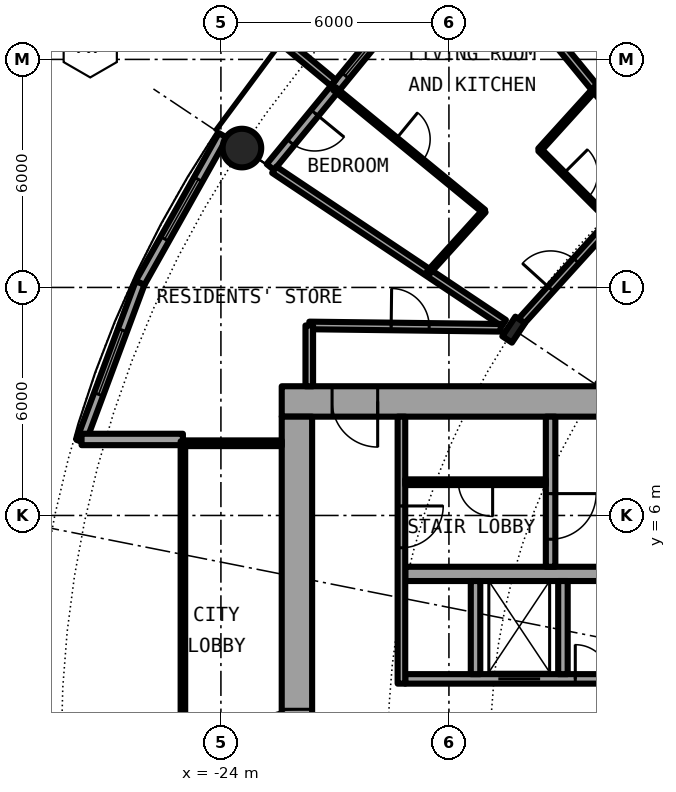
"""IFC4 building model, lengths in metres.
Left out: names, types, materials, properties, quantities, classifications, styles, units other than length and angle.
Written with IfcOpenShell. Run it as: python <this file> out.ifc"""

import sys

from ifc_helpers import new_model, si_unit, direction, frame, frame_2d, origin, origin_2d, place, context, subcontext, project, spatial, rectangle, hollow_circle, i_section, extrude, element, fill, save


model = new_model("IFC4")
c1 = context("Model", 3, precision=1e-05, world=origin(), true_north=direction((0.0, 1.0)))
c2 = subcontext(c1, "Body", "Model", "MODEL_VIEW")
j1 = project(units=[si_unit("LENGTHUNIT", "METRE"), si_unit("PLANEANGLEUNIT", "RADIAN")], contexts=[c1])
p1 = place(None, origin())
s1 = spatial("IfcSite", under=j1, at=p1, CompositionType="ELEMENT")
p2 = place(p1, origin())
s2 = spatial("IfcBuilding", under=s1, at=p2, CompositionType="ELEMENT")
p3 = place(p2, frame((0.0, 0.0, 47.2)))
s3 = spatial("IfcBuildingStorey", under=s2, at=p3, CompositionType="ELEMENT", Elevation=47.2)
p4 = place(p3, frame((-23.448, 15.667, 0.0), z_axis=(0.0, 0.0, 1.0), x_axis=(1.0, 0.0, 0.0)))
e1 = element("IfcColumn", 1, at=p4, inside=s3, PredefinedType="COLUMN", context=c2, shape_type="SweptSolid", body=[
    extrude(hollow_circle(Radius=0.508, WallThickness=0.05, at=origin_2d()), origin(), (0.0, 0.0, 1.0), 3.05),
])
p5 = place(p3, frame((-16.297, 10.889, 0.0), z_axis=(0.0, 0.0, 1.0), x_axis=(-0.831469612303, 0.55557023302, 0.0)))
e2 = element("IfcColumn", 2, at=p5, inside=s3, PredefinedType="COLUMN", context=c2, shape_type="SweptSolid", body=[
    extrude(i_section(OverallWidth=0.305, OverallDepth=0.62, WebThickness=0.021, FlangeThickness=0.04, FilletRadius=0.027, at=origin_2d()), origin(), (0.0, 0.0, 1.0), 3.05),
])
p6 = place(p3, frame((-19.304, 19.304, 0.0), z_axis=(0.0, 0.0, 1.0), x_axis=(-0.634382322723, -0.773019449054, 0.0)))
e3 = element("IfcWall", 3, at=p6, inside=s3, PredefinedType="SOLIDWALL", context=c2, shape_type="SweptSolid", body=[
    extrude(rectangle(XDim=5.352, YDim=0.25, at=frame_2d((2.676, 0.0))), origin(), (0.0, 0.0, 1.0), 2.7),
])
p7 = place(p6, frame((0.441, 0.0, 0.3)))
e4 = element("IfcOpeningElement", 4, at=p7, cuts=e3, PredefinedType="OPENING", context=c2, shape_type="SweptSolid", body=[
    extrude(rectangle(XDim=1.8, YDim=2.1, at=frame_2d((0.9, 1.05))), frame((0.0, 0.135, 0.0), z_axis=(0.0, -1.0, 0.0), x_axis=(1.0, 0.0, 0.0)), (0.0, 0.0, 1.0), 0.27),
])
p8 = place(p6, frame((3.51, 0.0, 0.0)))
e5 = element("IfcOpeningElement", 5, at=p8, cuts=e3, PredefinedType="OPENING", context=c2, shape_type="SweptSolid", body=[
    extrude(rectangle(XDim=1.0, YDim=2.2, at=frame_2d((0.5, 1.1))), frame((0.0, 0.135, 0.0), z_axis=(0.0, -1.0, 0.0), x_axis=(1.0, 0.0, 0.0)), (0.0, 0.0, 1.0), 0.27),
])
p9 = place(p3, frame((-21.041, 17.384, -0.03), z_axis=(0.0, 0.0, 1.0), x_axis=(-0.770784861449, 0.63709551667, 0.0)))
e6 = element("IfcWall", 6, at=p9, inside=s3, PredefinedType="SOLIDWALL", context=c2, shape_type="SweptSolid", body=[
    extrude(rectangle(XDim=3.006, YDim=0.2, at=frame_2d((1.503, 0.0))), origin(), (0.0, 0.0, 1.0), 2.73),
])
p10 = place(p3, frame((-23.946, 16.0, 0.0), z_axis=(0.0, 0.0, 1.0), x_axis=(-0.489696356642, -0.871893042919, 0.0)))
e7 = element("IfcWall", 7, at=p10, inside=s3, PredefinedType="SOLIDWALL", context=c2, shape_type="SweptSolid", body=[
    extrude(rectangle(XDim=4.454, YDim=0.25, at=frame_2d((2.227, 0.0))), origin(), (0.0, 0.0, 1.0), 2.7),
])
p11 = place(p10, frame((1.327, 0.0, 0.3)))
e8 = element("IfcOpeningElement", 8, at=p11, cuts=e7, PredefinedType="OPENING", context=c2, shape_type="SweptSolid", body=[
    extrude(rectangle(XDim=1.8, YDim=2.1, at=frame_2d((0.9, 1.05))), frame((0.0, 0.135, 0.0), z_axis=(0.0, -1.0, 0.0), x_axis=(1.0, 0.0, 0.0)), (0.0, 0.0, 1.0), 0.27),
])
p12 = place(p3, frame((-26.127, 12.117, 0.0), z_axis=(0.0, 0.0, 1.0), x_axis=(-0.349247811493, -0.937030397675, 0.0)))
e9 = element("IfcWall", 9, at=p12, inside=s3, PredefinedType="SOLIDWALL", context=c2, shape_type="SweptSolid", body=[
    extrude(rectangle(XDim=4.452, YDim=0.25, at=frame_2d((2.226, 0.0))), origin(), (0.0, 0.0, 1.0), 2.7),
])
p13 = place(p12, frame((1.327, 0.0, 0.3)))
e10 = element("IfcOpeningElement", 10, at=p13, cuts=e9, PredefinedType="OPENING", context=c2, shape_type="SweptSolid", body=[
    extrude(rectangle(XDim=1.8, YDim=2.1, at=frame_2d((0.9, 1.05))), frame((0.0, 0.135, 0.0), z_axis=(0.0, -1.0, 0.0), x_axis=(1.0, 0.0, 0.0)), (0.0, 0.0, 1.0), 0.27),
])
p14 = place(p3, frame((-25.0, 8.0, 0.0), z_axis=(0.0, 0.0, 1.0), x_axis=(-1.0, 0.0, 0.0)))
e11 = element("IfcWall", 11, at=p14, inside=s3, PredefinedType="SOLIDWALL", context=c2, shape_type="SweptSolid", body=[
    extrude(rectangle(XDim=2.667, YDim=0.3, at=frame_2d((1.333, 0.0))), origin(), (0.0, 0.0, 1.0), 2.7),
])
p15 = place(p3, frame((-8.2, 9.0, 0.0), z_axis=(0.0, 0.0, 1.0), x_axis=(-1.0, 0.0, 0.0)))
e12 = element("IfcWall", 12, at=p15, inside=s3, PredefinedType="SHEAR", context=c2, shape_type="SweptSolid", body=[
    extrude(rectangle(XDim=14.2, YDim=0.8, at=frame_2d((7.1, 0.0))), origin(), (0.0, 0.0, 1.0), 3.05),
])
p16 = place(p15, frame((11.675, 0.0, 0.0)))
e13 = element("IfcOpeningElement", 13, at=p16, cuts=e12, PredefinedType="OPENING", context=c2, shape_type="SweptSolid", body=[
    extrude(rectangle(XDim=1.2, YDim=2.3, at=frame_2d((0.6, 1.15))), frame((0.0, 0.41, 0.0), z_axis=(0.0, -1.0, 0.0), x_axis=(1.0, 0.0, 0.0)), (0.0, 0.0, 1.0), 0.82),
])
p17 = place(p3, frame((-22.0, -8.6, 0.0), z_axis=(0.0, 0.0, 1.0), x_axis=(0.0, 1.0, 0.0)))
e14 = element("IfcWall", 14, at=p17, inside=s3, PredefinedType="SHEAR", context=c2, shape_type="SweptSolid", body=[
    extrude(rectangle(XDim=17.2, YDim=0.8, at=frame_2d((8.6, 0.0))), origin(), (0.0, 0.0, 1.0), 3.05),
])
p18 = place(p17, frame((7.7, 0.0, 0.0)))
e15 = element("IfcOpeningElement", 15, at=p18, cuts=e14, PredefinedType="OPENING", context=c2, shape_type="SweptSolid", body=[
    extrude(rectangle(XDim=1.8, YDim=2.3, at=frame_2d((0.9, 1.15))), frame((0.0, 0.41, 0.0), z_axis=(0.0, -1.0, 0.0), x_axis=(1.0, 0.0, 0.0)), (0.0, 0.0, 1.0), 0.82),
])
p19 = place(p3, frame((-19.15, 1.7, 0.0), z_axis=(0.0, 0.0, 1.0), x_axis=(1.0, 0.0, 0.0)))
e16 = element("IfcWall", 16, at=p19, inside=s3, PredefinedType="SHEAR", context=c2, shape_type="SweptSolid", body=[
    extrude(rectangle(XDim=10.15, YDim=0.25, at=frame_2d((5.075, 0.0))), origin(), (0.0, 0.0, 1.0), 3.05),
])
p20 = place(p19, frame((2.45, 0.0, 0.0)))
e17 = element("IfcOpeningElement", 17, at=p20, cuts=e16, PredefinedType="OPENING", context=c2, shape_type="SweptSolid", body=[
    extrude(rectangle(XDim=1.1, YDim=2.3, at=frame_2d((0.55, 1.15))), frame((0.0, 0.135, 0.0), z_axis=(0.0, -1.0, 0.0), x_axis=(1.0, 0.0, 0.0)), (0.0, 0.0, 1.0), 0.27),
])
p21 = place(p19, frame((8.538, 0.0, 0.0)))
e18 = element("IfcOpeningElement", 18, at=p21, cuts=e16, PredefinedType="OPENING", context=c2, shape_type="SweptSolid", body=[
    extrude(rectangle(XDim=0.9, YDim=2.3, at=frame_2d((0.45, 1.15))), frame((0.0, 0.135, 0.0), z_axis=(0.0, -1.0, 0.0), x_axis=(1.0, 0.0, 0.0)), (0.0, 0.0, 1.0), 0.27),
])
p22 = place(p19, frame((6.25, 0.0, 0.0)))
e19 = element("IfcOpeningElement", 19, at=p22, cuts=e16, PredefinedType="OPENING", context=c2, shape_type="SweptSolid", body=[
    extrude(rectangle(XDim=0.9, YDim=2.3, at=frame_2d((0.45, 1.15))), frame((0.0, 0.135, 0.0), z_axis=(0.0, -1.0, 0.0), x_axis=(1.0, 0.0, 0.0)), (0.0, 0.0, 1.0), 0.27),
])
p23 = place(p19, frame((4.475, 0.0, 0.0)))
e20 = element("IfcOpeningElement", 20, at=p23, cuts=e16, PredefinedType="OPENING", context=c2, shape_type="SweptSolid", body=[
    extrude(rectangle(XDim=0.9, YDim=2.3, at=frame_2d((0.45, 1.15))), frame((0.0, 0.135, 0.0), z_axis=(0.0, -1.0, 0.0), x_axis=(1.0, 0.0, 0.0)), (0.0, 0.0, 1.0), 0.27),
])
p24 = place(p3, frame((-9.0, 4.462, 0.0), z_axis=(0.0, 0.0, 1.0), x_axis=(-1.0, 0.0, 0.0)))
e21 = element("IfcWall", 21, at=p24, inside=s3, PredefinedType="SHEAR", context=c2, shape_type="SweptSolid", body=[
    extrude(rectangle(XDim=10.15, YDim=0.375, at=frame_2d((5.075, 0.0))), origin(), (0.0, 0.0, 1.0), 3.05),
])
p25 = place(p3, frame((-15.325, 8.6, 0.0), z_axis=(0.0, 0.0, 1.0), x_axis=(0.0, -1.0, 0.0)))
e22 = element("IfcWall", 22, at=p25, inside=s3, PredefinedType="SHEAR", context=c2, shape_type="SweptSolid", body=[
    extrude(rectangle(XDim=3.95, YDim=0.25, at=frame_2d((1.975, 0.0))), origin(), (0.0, 0.0, 1.0), 3.05),
])
p26 = place(p25, frame((2.025, 0.0, 0.0)))
e23 = element("IfcOpeningElement", 23, at=p26, cuts=e22, PredefinedType="OPENING", context=c2, shape_type="SweptSolid", body=[
    extrude(rectangle(XDim=1.2, YDim=2.3, at=frame_2d((0.6, 1.15))), frame((0.0, 0.135, 0.0), z_axis=(0.0, -1.0, 0.0), x_axis=(1.0, 0.0, 0.0)), (0.0, 0.0, 1.0), 0.27),
])
for number, where, z_axis, x_axis in (
    (24, (-15.0, 1.825, 0.0), (0.0, 0.0, 1.0), (0.0, 1.0, 0.0)),
    (25, (-17.3, 1.825, 0.0), (0.0, 0.0, 1.0), (0.0, 1.0, 0.0)),
):
    element("IfcWall", number, at=place(p3, frame(where, z_axis=z_axis, x_axis=x_axis)), inside=s3, PredefinedType="SOLIDWALL", context=c2, shape_type="SweptSolid", body=[
        extrude(rectangle(XDim=2.45, YDim=0.25, at=frame_2d((1.225, 0.0))), origin(), (0.0, 0.0, 1.0), 2.7),
    ])
p27 = place(p3, frame((-19.25, 8.6, 0.0), z_axis=(0.0, 0.0, 1.0), x_axis=(0.0, -1.0, 0.0)))
e26 = element("IfcWall", 26, at=p27, inside=s3, PredefinedType="SOLIDWALL", context=c2, shape_type="SweptSolid", body=[
    extrude(rectangle(XDim=7.025, YDim=0.2, at=frame_2d((3.513, 0.0))), origin(), (0.0, 0.0, 1.0), 2.7),
])
p28 = place(p27, frame((2.35, 0.0, 0.0)))
e27 = element("IfcOpeningElement", 27, at=p28, cuts=e26, PredefinedType="OPENING", context=c2, shape_type="SweptSolid", body=[
    extrude(rectangle(XDim=1.1, YDim=2.3, at=frame_2d((0.55, 1.15))), frame((0.0, 0.11, 0.0), z_axis=(0.0, -1.0, 0.0), x_axis=(1.0, 0.0, 0.0)), (0.0, 0.0, 1.0), 0.22),
])
p29 = place(p3, frame((-15.45, 6.875, 0.0), z_axis=(0.0, 0.0, 1.0), x_axis=(-1.0, 0.0, 0.0)))
e28 = element("IfcWall", 28, at=p29, inside=s3, PredefinedType="PARTITIONING", context=c2, shape_type="SweptSolid", body=[
    extrude(rectangle(XDim=3.7, YDim=0.15, at=frame_2d((1.85, 0.0))), origin(), (0.0, 0.0, 1.0), 2.7),
])
p30 = place(p29, frame((1.4, 0.0, 0.0)))
e29 = element("IfcOpeningElement", 29, at=p30, cuts=e28, PredefinedType="OPENING", context=c2, shape_type="SweptSolid", body=[
    extrude(rectangle(XDim=0.9, YDim=2.3, at=frame_2d((0.45, 1.15))), frame((0.0, 0.085, 0.0), z_axis=(0.0, -1.0, 0.0), x_axis=(1.0, 0.0, 0.0)), (0.0, 0.0, 1.0), 0.17),
])
p31 = place(p3, frame((-22.4, 7.9, 0.0), z_axis=(0.0, 0.0, 1.0), x_axis=(-1.0, 0.0, 0.0)))
e30 = element("IfcWall", 30, at=p31, inside=s3, PredefinedType="PARTITIONING", context=c2, shape_type="SweptSolid", body=[
    extrude(rectangle(XDim=2.54, YDim=0.15, at=frame_2d((1.27, 0.0))), origin(), (0.0, 0.0, 1.0), 2.7),
])
p32 = place(p3, frame((-25.0, 7.95, 0.0), z_axis=(0.0, 0.0, 1.0), x_axis=(0.0, -1.0, 0.0)))
e31 = element("IfcWall", 31, at=p32, inside=s3, PredefinedType="PARTITIONING", context=c2, shape_type="SweptSolid", body=[
    extrude(rectangle(XDim=15.9, YDim=0.12, at=frame_2d((7.95, 0.0))), origin(), (0.0, 0.0, 1.0), 2.7),
])
p33 = place(p32, frame((0.95, 0.0, 0.1)))
e32 = element("IfcOpeningElement", 32, at=p33, cuts=e31, PredefinedType="OPENING", context=c2, shape_type="SweptSolid", body=[
    extrude(rectangle(XDim=14.0, YDim=2.35, at=frame_2d((7.0, 1.175))), frame((0.0, 0.07, 0.0), z_axis=(0.0, -1.0, 0.0), x_axis=(1.0, 0.0, 0.0)), (0.0, 0.0, 1.0), 0.14),
])
p34 = place(p3, frame((-22.596, 15.097, 0.0), z_axis=(0.0, 0.0, 1.0), x_axis=(0.831507055747, -0.555514190857, 0.0)))
e33 = element("IfcWall", 33, at=p34, inside=s3, PredefinedType="PARTITIONING", context=c2, shape_type="SweptSolid", body=[
    extrude(rectangle(XDim=7.265, YDim=0.2, at=frame_2d((3.633, 0.0))), origin(), (0.0, 0.0, 1.0), 2.7),
])
p35 = place(p3, frame((-21.014, 17.231, 0.0), z_axis=(0.0, 0.0, 1.0), x_axis=(0.773219330916, -0.634138680651, 0.0)))
e34 = element("IfcWall", 34, at=p35, inside=s3, PredefinedType="PARTITIONING", context=c2, shape_type="SweptSolid", body=[
    extrude(rectangle(XDim=5.089, YDim=0.1, at=frame_2d((2.544, 0.0))), origin(), (0.0, 0.0, 1.0), 2.7),
])
p36 = place(p35, frame((2.095, 0.0, 0.0)))
e35 = element("IfcOpeningElement", 35, at=p36, cuts=e34, PredefinedType="OPENING", context=c2, shape_type="SweptSolid", body=[
    extrude(rectangle(XDim=0.9, YDim=2.3, at=frame_2d((0.45, 1.15))), frame((0.0, 0.06, 0.0), z_axis=(0.0, -1.0, 0.0), x_axis=(1.0, 0.0, 0.0)), (0.0, 0.0, 1.0), 0.12),
])
p37 = place(p3, frame((-17.243, 21.005, 0.0), z_axis=(0.0, 0.0, 1.0), x_axis=(0.63447412651, -0.772944100689, 0.0)))
e36 = element("IfcWall", 36, at=p37, inside=s3, PredefinedType="PARTITIONING", context=c2, shape_type="SweptSolid", body=[
    extrude(rectangle(XDim=7.576, YDim=0.2, at=frame_2d((3.788, 0.0))), origin(), (0.0, 0.0, 1.0), 2.7),
])
p38 = place(p3, frame((-15.612, 15.622, 0.0), z_axis=(0.0, 0.0, 1.0), x_axis=(0.706741540154, -0.707471833659, 0.0)))
e37 = element("IfcWall", 37, at=p38, inside=s3, PredefinedType="PARTITIONING", context=c2, shape_type="SweptSolid", body=[
    extrude(rectangle(XDim=2.674, YDim=0.1, at=frame_2d((1.337, 0.0))), origin(), (0.0, 0.0, 1.0), 2.7),
])
p39 = place(p38, frame((0.887, 0.0, 0.0)))
e38 = element("IfcOpeningElement", 38, at=p39, cuts=e37, PredefinedType="OPENING", context=c2, shape_type="SweptSolid", body=[
    extrude(rectangle(XDim=0.9, YDim=2.3, at=frame_2d((0.45, 1.15))), frame((0.0, 0.06, 0.0), z_axis=(0.0, -1.0, 0.0), x_axis=(1.0, 0.0, 0.0)), (0.0, 0.0, 1.0), 0.12),
])
p40 = place(p3, frame((-21.675, 11.0, 0.0), z_axis=(0.0, 0.0, 1.0), x_axis=(0.99992425795, -0.012307654658, 0.0)))
e39 = element("IfcWall", 39, at=p40, inside=s3, PredefinedType="PARTITIONING", context=c2, shape_type="SweptSolid", body=[
    extrude(rectangle(XDim=5.039, YDim=0.2, at=frame_2d((2.519, 0.0))), origin(), (0.0, 0.0, 1.0), 2.7),
])
p41 = place(p40, frame((2.155, 0.0, 0.0)))
e40 = element("IfcOpeningElement", 40, at=p41, cuts=e39, PredefinedType="OPENING", context=c2, shape_type="SweptSolid", body=[
    extrude(rectangle(XDim=1.0, YDim=2.3, at=frame_2d((0.5, 1.15))), frame((0.0, 0.11, 0.0), z_axis=(0.0, -1.0, 0.0), x_axis=(1.0, 0.0, 0.0)), (0.0, 0.0, 1.0), 0.22),
])
p42 = place(p3, frame((-16.193, 11.003, 0.0), z_axis=(0.0, 0.0, 1.0), x_axis=(0.671514934772, 0.740991020444, 0.0)))
e41 = element("IfcWall", 41, at=p42, inside=s3, PredefinedType="PARTITIONING", context=c2, shape_type="SweptSolid", body=[
    extrude(rectangle(XDim=5.598, YDim=0.2, at=frame_2d((2.799, 0.0))), origin(), (0.0, 0.0, 1.0), 2.38),
])
p43 = place(p42, frame((1.293, 0.0, 0.0)))
e42 = element("IfcOpeningElement", 42, at=p43, cuts=e41, PredefinedType="OPENING", context=c2, shape_type="SweptSolid", body=[
    extrude(rectangle(XDim=1.0, YDim=2.3, at=frame_2d((0.5, 1.15))), frame((0.0, 0.11, 0.0), z_axis=(0.0, -1.0, 0.0), x_axis=(1.0, 0.0, 0.0)), (0.0, 0.0, 1.0), 0.22),
])
p44 = place(p3, frame((-14.149, 17.236, 0.0), z_axis=(0.0, 0.0, 1.0), x_axis=(0.923874819588, 0.382694810171, 0.0)))
e43 = element("IfcWall", 43, at=p44, inside=s3, PredefinedType="PARTITIONING", context=c2, shape_type="SweptSolid", body=[
    extrude(rectangle(XDim=2.158, YDim=0.1, at=frame_2d((1.079, 0.0))), origin(), (0.0, 0.0, 1.0), 2.7),
])
p45 = place(p3, frame((-21.675, 9.4, 0.0), z_axis=(0.0, 0.0, 1.0), x_axis=(0.0, 1.0, 0.0)))
e44 = element("IfcWall", 44, at=p45, inside=s3, PredefinedType="PARTITIONING", context=c2, shape_type="SweptSolid", body=[
    extrude(rectangle(XDim=1.6, YDim=0.2, at=frame_2d((0.8, 0.0))), origin(), (0.0, 0.0, 1.0), 2.7),
])
for number, where, z_axis, x_axis in (
    (45, (-18.538, 12.394, 0.0), (0.0, 0.0, 1.0), (0.672, 0.741, 0.0)),
    (46, (-15.613, 15.621, 0.0), (0.0, 0.0, 1.0), (0.672, 0.741, 0.0)),
):
    element("IfcWall", number, at=place(p3, frame(where, z_axis=z_axis, x_axis=x_axis)), inside=s3, PredefinedType="PARTITIONING", context=c2, shape_type="SweptSolid", body=[
        extrude(rectangle(XDim=2.183, YDim=0.1, at=frame_2d((1.091, 0.0))), origin(), (0.0, 0.0, 1.0), 2.7),
    ])
p46 = place(p7, origin())
e47 = element("IfcWindow", 47, at=p46, inside=s3, PartitioningType="SINGLE_PANEL", PredefinedType="WINDOW", context=c2, shape_type="SweptSolid", body=[
    extrude(rectangle(XDim=1.8, YDim=2.1, at=frame_2d((0.9, 1.05))), frame((0.0, 0.03, 0.0), z_axis=(0.0, -1.0, 0.0), x_axis=(1.0, 0.0, 0.0)), (0.0, 0.0, 1.0), 0.06),
])
fill(e4, e47)
p47 = place(p8, origin())
e48 = element("IfcDoor", 48, at=p47, inside=s3, OperationType="SINGLE_SWING_LEFT", PredefinedType="DOOR", context=c2, shape_type="SweptSolid", body=[
    extrude(rectangle(XDim=1.0, YDim=2.2, at=frame_2d((0.5, 1.1))), frame((0.0, 0.025, 0.0), z_axis=(0.0, -1.0, 0.0), x_axis=(1.0, 0.0, 0.0)), (0.0, 0.0, 1.0), 0.05),
])
fill(e5, e48)
p48 = place(p11, origin())
e49 = element("IfcWindow", 49, at=p48, inside=s3, PartitioningType="SINGLE_PANEL", PredefinedType="WINDOW", context=c2, shape_type="SweptSolid", body=[
    extrude(rectangle(XDim=1.8, YDim=2.1, at=frame_2d((0.9, 1.05))), frame((0.0, 0.03, 0.0), z_axis=(0.0, -1.0, 0.0), x_axis=(1.0, 0.0, 0.0)), (0.0, 0.0, 1.0), 0.06),
])
fill(e8, e49)
p49 = place(p13, origin())
e50 = element("IfcWindow", 50, at=p49, inside=s3, PartitioningType="SINGLE_PANEL", PredefinedType="WINDOW", context=c2, shape_type="SweptSolid", body=[
    extrude(rectangle(XDim=1.8, YDim=2.1, at=frame_2d((0.9, 1.05))), frame((0.0, 0.03, 0.0), z_axis=(0.0, -1.0, 0.0), x_axis=(1.0, 0.0, 0.0)), (0.0, 0.0, 1.0), 0.06),
])
fill(e10, e50)
p50 = place(p20, origin())
e51 = element("IfcDoor", 51, at=p50, inside=s3, OperationType="DOUBLE_DOOR_SLIDING", PredefinedType="DOOR", context=c2, shape_type="SweptSolid", body=[
    extrude(rectangle(XDim=1.1, YDim=2.3, at=frame_2d((0.55, 1.15))), frame((0.0, 0.025, 0.0), z_axis=(0.0, -1.0, 0.0), x_axis=(1.0, 0.0, 0.0)), (0.0, 0.0, 1.0), 0.05),
])
fill(e17, e51)
p51 = place(p23, origin())
e52 = element("IfcDoor", 52, at=p51, inside=s3, OperationType="SINGLE_SWING_RIGHT", PredefinedType="DOOR", context=c2, shape_type="SweptSolid", body=[
    extrude(rectangle(XDim=0.9, YDim=2.3, at=frame_2d((0.45, 1.15))), frame((0.0, 0.025, 0.0), z_axis=(0.0, -1.0, 0.0), x_axis=(1.0, 0.0, 0.0)), (0.0, 0.0, 1.0), 0.05),
])
fill(e20, e52)
p52 = place(p30, origin())
e53 = element("IfcDoor", 53, at=p52, inside=s3, OperationType="SINGLE_SWING_LEFT", PredefinedType="DOOR", context=c2, shape_type="SweptSolid", body=[
    extrude(rectangle(XDim=0.9, YDim=2.3, at=frame_2d((0.45, 1.15))), frame((0.0, 0.025, 0.0), z_axis=(0.0, -1.0, 0.0), x_axis=(1.0, 0.0, 0.0)), (0.0, 0.0, 1.0), 0.05),
])
fill(e29, e53)
p53 = place(p26, origin())
e54 = element("IfcDoor", 54, at=p53, inside=s3, OperationType="SINGLE_SWING_LEFT", PredefinedType="DOOR", context=c2, shape_type="SweptSolid", body=[
    extrude(rectangle(XDim=1.2, YDim=2.3, at=frame_2d((0.6, 1.15))), frame((0.0, 0.025, 0.0), z_axis=(0.0, -1.0, 0.0), x_axis=(1.0, 0.0, 0.0)), (0.0, 0.0, 1.0), 0.05),
])
fill(e23, e54)
p54 = place(p28, origin())
e55 = element("IfcDoor", 55, at=p54, inside=s3, OperationType="SINGLE_SWING_RIGHT", PredefinedType="DOOR", context=c2, shape_type="SweptSolid", body=[
    extrude(rectangle(XDim=1.1, YDim=2.3, at=frame_2d((0.55, 1.15))), frame((0.0, 0.025, 0.0), z_axis=(0.0, -1.0, 0.0), x_axis=(1.0, 0.0, 0.0)), (0.0, 0.0, 1.0), 0.05),
])
fill(e27, e55)
p55 = place(p16, origin())
e56 = element("IfcDoor", 56, at=p55, inside=s3, OperationType="SINGLE_SWING_LEFT", PredefinedType="DOOR", context=c2, shape_type="SweptSolid", body=[
    extrude(rectangle(XDim=1.2, YDim=2.3, at=frame_2d((0.6, 1.15))), frame((0.0, 0.025, 0.0), z_axis=(0.0, -1.0, 0.0), x_axis=(1.0, 0.0, 0.0)), (0.0, 0.0, 1.0), 0.05),
])
fill(e13, e56)
p56 = place(p18, origin())
e57 = element("IfcDoor", 57, at=p56, inside=s3, OperationType="SINGLE_SWING_LEFT", PredefinedType="DOOR", context=c2, shape_type="SweptSolid", body=[
    extrude(rectangle(XDim=1.8, YDim=2.3, at=frame_2d((0.9, 1.15))), frame((0.0, 0.025, 0.0), z_axis=(0.0, -1.0, 0.0), x_axis=(1.0, 0.0, 0.0)), (0.0, 0.0, 1.0), 0.05),
])
fill(e15, e57)
p57 = place(p33, origin())
e58 = element("IfcWindow", 58, at=p57, inside=s3, PartitioningType="SINGLE_PANEL", PredefinedType="WINDOW", context=c2, shape_type="SweptSolid", body=[
    extrude(rectangle(XDim=14.0, YDim=2.35, at=frame_2d((7.0, 1.175))), frame((0.0, 0.03, 0.0), z_axis=(0.0, -1.0, 0.0), x_axis=(1.0, 0.0, 0.0)), (0.0, 0.0, 1.0), 0.06),
])
fill(e32, e58)
p58 = place(p43, origin())
e59 = element("IfcDoor", 59, at=p58, inside=s3, OperationType="SINGLE_SWING_LEFT", PredefinedType="DOOR", context=c2, shape_type="SweptSolid", body=[
    extrude(rectangle(XDim=1.0, YDim=2.3, at=frame_2d((0.5, 1.15))), frame((0.0, 0.025, 0.0), z_axis=(0.0, -1.0, 0.0), x_axis=(1.0, 0.0, 0.0)), (0.0, 0.0, 1.0), 0.05),
])
fill(e42, e59)
p59 = place(p39, origin())
e60 = element("IfcDoor", 60, at=p59, inside=s3, OperationType="SINGLE_SWING_RIGHT", PredefinedType="DOOR", context=c2, shape_type="SweptSolid", body=[
    extrude(rectangle(XDim=0.9, YDim=2.3, at=frame_2d((0.45, 1.15))), frame((0.0, 0.025, 0.0), z_axis=(0.0, -1.0, 0.0), x_axis=(1.0, 0.0, 0.0)), (0.0, 0.0, 1.0), 0.05),
])
fill(e38, e60)
p60 = place(p36, origin())
e61 = element("IfcDoor", 61, at=p60, inside=s3, OperationType="SINGLE_SWING_RIGHT", PredefinedType="DOOR", context=c2, shape_type="SweptSolid", body=[
    extrude(rectangle(XDim=0.9, YDim=2.3, at=frame_2d((0.45, 1.15))), frame((0.0, 0.025, 0.0), z_axis=(0.0, -1.0, 0.0), x_axis=(1.0, 0.0, 0.0)), (0.0, 0.0, 1.0), 0.05),
])
fill(e35, e61)
p61 = place(p41, origin())
e62 = element("IfcDoor", 62, at=p61, inside=s3, OperationType="SINGLE_SWING_RIGHT", PredefinedType="DOOR", context=c2, shape_type="SweptSolid", body=[
    extrude(rectangle(XDim=1.0, YDim=2.3, at=frame_2d((0.5, 1.15))), frame((0.0, 0.025, 0.0), z_axis=(0.0, -1.0, 0.0), x_axis=(1.0, 0.0, 0.0)), (0.0, 0.0, 1.0), 0.05),
])
fill(e40, e62)
save(model, sys.argv[1])
